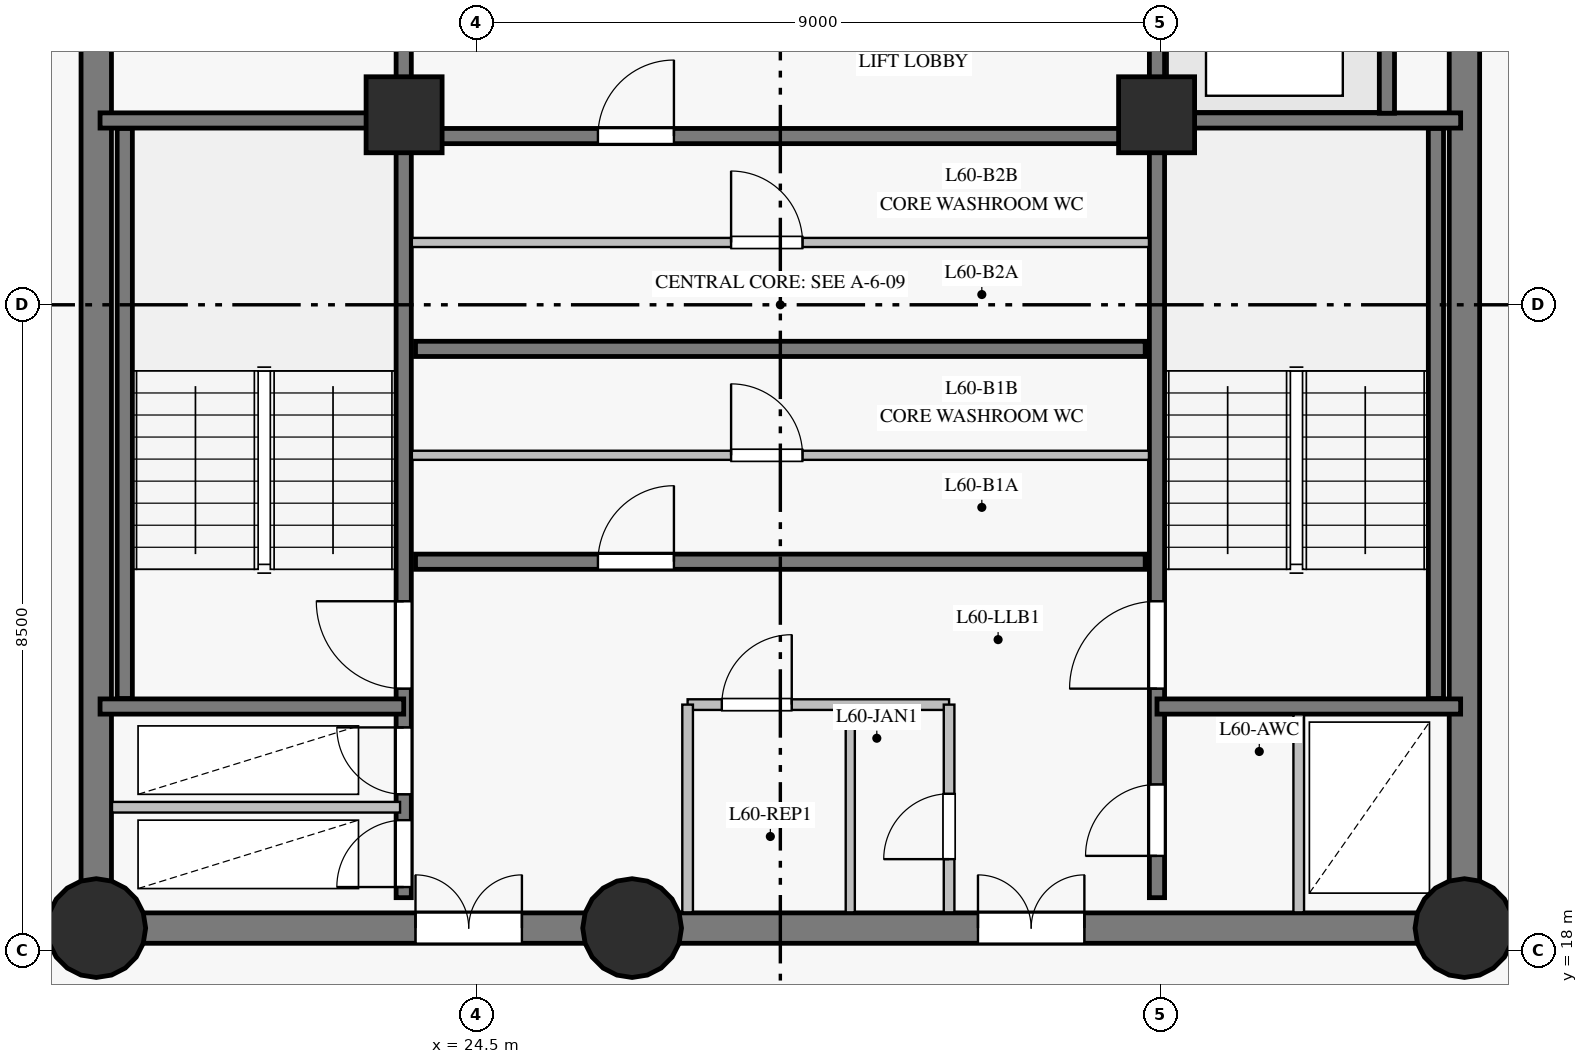
"""IFC4 building model, lengths in metres.
Left out: names, types, materials, properties, quantities, classifications, styles, units other than length and angle.
Written with IfcOpenShell. Run it as: python <this file> out.ifc"""

import sys

from ifc_helpers import new_model, si_unit, direction, frame, frame_2d, origin, origin_with_axes, origin_2d, place, context, subcontext, project, spatial, rectangle, circle, extrude, source, transform, mapped, element, fill, save


model = new_model("IFC4")
c1 = context("Model", 3, precision=1e-05, world=origin(), true_north=direction((0.0, 1.0)))
c2 = subcontext(c1, "Body", "Model", "MODEL_VIEW")
j1 = project(units=[si_unit("LENGTHUNIT", "METRE"), si_unit("PLANEANGLEUNIT", "RADIAN")], contexts=[c1])
p1 = place(None, origin())
s1 = spatial("IfcSite", under=j1, at=p1, CompositionType="ELEMENT")
p2 = place(p1, origin())
s2 = spatial("IfcBuilding", under=s1, at=p2, CompositionType="ELEMENT")
p3 = place(p2, frame((0.0, 0.0, 205.35)))
s3 = spatial("IfcBuildingStorey", under=s2, at=p3, CompositionType="ELEMENT", Elevation=205.35)
p4 = place(p3, frame((19.5, 18.3, 0.0), z_axis=(0.0, 0.0, 1.0), x_axis=(1.0, 0.0, 0.0)))
e1 = element("IfcWall", 1, at=p4, inside=s3, PredefinedType="SHEAR", context=c2, shape_type="SweptSolid", body=[
    extrude(rectangle(XDim=7.05, YDim=0.4, at=frame_2d((3.525, 0.0))), origin(), (0.0, 0.0, 1.0), 2.775),
])
p5 = place(p4, frame((4.2, 0.0, 0.0)))
e2 = element("IfcOpeningElement", 2, at=p5, cuts=e1, PredefinedType="OPENING", context=c2, shape_type="SweptSolid", body=[
    extrude(rectangle(XDim=1.4, YDim=2.2, at=frame_2d((0.7, 1.1))), frame((0.0, 0.21, 0.0), z_axis=(0.0, -1.0, 0.0), x_axis=(1.0, 0.0, 0.0)), (0.0, 0.0, 1.0), 0.42),
])
p6 = place(p3, frame((26.55, 18.3, 0.0), z_axis=(0.0, 0.0, 1.0), x_axis=(1.0, 0.0, 0.0)))
e3 = element("IfcWall", 3, at=p6, inside=s3, PredefinedType="SHEAR", context=c2, shape_type="SweptSolid", body=[
    extrude(rectangle(XDim=10.95, YDim=0.4, at=frame_2d((5.475, 0.0))), origin(), (0.0, 0.0, 1.0), 2.775),
])
p7 = place(p6, frame((4.55, 0.0, 0.0)))
e4 = element("IfcOpeningElement", 4, at=p7, cuts=e3, PredefinedType="OPENING", context=c2, shape_type="SweptSolid", body=[
    extrude(rectangle(XDim=1.4, YDim=2.2, at=frame_2d((0.7, 1.1))), frame((0.0, 0.21, 0.0), z_axis=(0.0, -1.0, 0.0), x_axis=(1.0, 0.0, 0.0)), (0.0, 0.0, 1.0), 0.42),
])
p8 = place(p3, frame((37.5, 18.3, 0.0), z_axis=(0.0, 0.0, 1.0), x_axis=(0.0, 1.0, 0.0)))
e5 = element("IfcWall", 5, at=p8, inside=s3, PredefinedType="SHEAR", context=c2, shape_type="SweptSolid", body=[
    extrude(rectangle(XDim=16.4, YDim=0.4, at=frame_2d((8.2, 0.0))), origin(), (0.0, 0.0, 1.0), 2.775),
])
p9 = place(p8, frame((13.85, 0.0, 0.0)))
e6 = element("IfcOpeningElement", 6, at=p9, cuts=e5, PredefinedType="OPENING", context=c2, shape_type="SweptSolid", body=[
    extrude(rectangle(XDim=1.2, YDim=2.15, at=frame_2d((0.6, 1.075))), frame((0.0, 0.21, 0.0), z_axis=(0.0, -1.0, 0.0), x_axis=(1.0, 0.0, 0.0)), (0.0, 0.0, 1.0), 0.42),
])
p10 = place(p3, frame((19.5, 34.7, 0.0), z_axis=(0.0, 0.0, 1.0), x_axis=(0.0, -1.0, 0.0)))
e7 = element("IfcWall", 7, at=p10, inside=s3, PredefinedType="SHEAR", context=c2, shape_type="SweptSolid", body=[
    extrude(rectangle(XDim=16.4, YDim=0.4, at=frame_2d((8.2, 0.0))), origin(), (0.0, 0.0, 1.0), 2.775),
])
p11 = place(p10, frame((3.1, 0.0, 0.0)))
e8 = element("IfcOpeningElement", 8, at=p11, cuts=e7, PredefinedType="OPENING", context=c2, shape_type="SweptSolid", body=[
    extrude(rectangle(XDim=1.1, YDim=2.15, at=frame_2d((0.55, 1.075))), frame((0.0, 0.21, 0.0), z_axis=(0.0, -1.0, 0.0), x_axis=(1.0, 0.0, 0.0)), (0.0, 0.0, 1.0), 0.42),
])
m1 = source(origin_with_axes(), c2, "Body", "SweptSolid", [
    extrude(circle(Radius=0.65, at=origin_2d()), origin(), (0.0, 0.0, 1.0), 3.05),
])
for number, where, z_axis, x_axis in (
    (9, (19.5, 18.3, 0.0), (0.0, 0.0, 1.0), (1.0, 0.0, 0.0)),
    (10, (26.55, 18.3, 0.0), (0.0, 0.0, 1.0), (1.0, 0.0, 0.0)),
    (11, (37.5, 18.3, 0.0), (0.0, 0.0, 1.0), (1.0, 0.0, 0.0)),
):
    element("IfcColumn", number, at=place(p3, frame(where, z_axis=z_axis, x_axis=x_axis)), inside=s3, PredefinedType="COLUMN", context=c2, shape_type="MappedRepresentation", body=[
        mapped(m1, transform((0.0, 0.0, 0.0), scale=1.0)),
    ])
m2 = source(origin_with_axes(), c2, "Body", "SweptSolid", [
    extrude(rectangle(XDim=1.0, YDim=1.0, at=origin_2d()), origin(), (0.0, 0.0, 1.0), 3.05),
])
for number, where, z_axis, x_axis in (
    (12, (23.55, 29.0, 0.0), (0.0, 0.0, 1.0), (1.0, 0.0, 0.0)),
    (13, (33.45, 29.0, 0.0), (0.0, 0.0, 1.0), (1.0, 0.0, 0.0)),
):
    element("IfcColumn", number, at=place(p3, frame(where, z_axis=z_axis, x_axis=x_axis)), inside=s3, PredefinedType="COLUMN", context=c2, shape_type="MappedRepresentation", body=[
        mapped(m2, transform((0.0, 0.0, 0.0), scale=1.0)),
    ])
p12 = place(p3, frame((23.545, 18.7, 0.0), z_axis=(0.0, 0.0, 1.0), x_axis=(0.0, 1.0, 0.0)))
e14 = element("IfcWall", 14, at=p12, inside=s3, PredefinedType="SHEAR", context=c2, shape_type="SweptSolid", body=[
    extrude(rectangle(XDim=15.6, YDim=0.2, at=frame_2d((7.8, 0.0))), origin(), (0.0, 0.0, 1.0), 2.775),
])
p13 = place(p12, frame((2.75, 0.0, 0.0)))
e15 = element("IfcOpeningElement", 15, at=p13, cuts=e14, PredefinedType="OPENING", context=c2, shape_type="SweptSolid", body=[
    extrude(rectangle(XDim=1.15, YDim=2.15, at=frame_2d((0.575, 1.075))), frame((0.0, 0.11, 0.0), z_axis=(0.0, -1.0, 0.0), x_axis=(1.0, 0.0, 0.0)), (0.0, 0.0, 1.0), 0.22),
])
p14 = place(p12, frame((0.14, 0.0, 0.0)))
e16 = element("IfcOpeningElement", 16, at=p14, cuts=e14, PredefinedType="OPENING", context=c2, shape_type="SweptSolid", body=[
    extrude(rectangle(XDim=0.88, YDim=2.1, at=frame_2d((0.44, 1.05))), frame((0.0, 0.11, 0.0), z_axis=(0.0, -1.0, 0.0), x_axis=(1.0, 0.0, 0.0)), (0.0, 0.0, 1.0), 0.22),
])
p15 = place(p12, frame((1.36, 0.0, 0.0)))
e17 = element("IfcOpeningElement", 17, at=p15, cuts=e14, PredefinedType="OPENING", context=c2, shape_type="SweptSolid", body=[
    extrude(rectangle(XDim=0.88, YDim=2.1, at=frame_2d((0.44, 1.05))), frame((0.0, 0.11, 0.0), z_axis=(0.0, -1.0, 0.0), x_axis=(1.0, 0.0, 0.0)), (0.0, 0.0, 1.0), 0.22),
])
p16 = place(p12, frame((12.1, 0.0, 0.0)))
e18 = element("IfcOpeningElement", 18, at=p16, cuts=e14, PredefinedType="OPENING", context=c2, shape_type="SweptSolid", body=[
    extrude(rectangle(XDim=1.12, YDim=2.15, at=frame_2d((0.56, 1.075))), frame((0.0, 0.11, 0.0), z_axis=(0.0, -1.0, 0.0), x_axis=(1.0, 0.0, 0.0)), (0.0, 0.0, 1.0), 0.22),
])
p17 = place(p12, frame((14.05, 0.0, 0.0)))
e19 = element("IfcOpeningElement", 19, at=p17, cuts=e14, PredefinedType="OPENING", context=c2, shape_type="SweptSolid", body=[
    extrude(rectangle(XDim=1.12, YDim=2.15, at=frame_2d((0.56, 1.075))), frame((0.0, 0.11, 0.0), z_axis=(0.0, -1.0, 0.0), x_axis=(1.0, 0.0, 0.0)), (0.0, 0.0, 1.0), 0.22),
])
p18 = place(p3, frame((33.455, 18.7, 0.0), z_axis=(0.0, 0.0, 1.0), x_axis=(0.0, 1.0, 0.0)))
e20 = element("IfcWall", 20, at=p18, inside=s3, PredefinedType="SHEAR", context=c2, shape_type="SweptSolid", body=[
    extrude(rectangle(XDim=15.6, YDim=0.2, at=frame_2d((7.8, 0.0))), origin(), (0.0, 0.0, 1.0), 2.775),
])
p19 = place(p18, frame((2.75, 0.0, 0.0)))
e21 = element("IfcOpeningElement", 21, at=p19, cuts=e20, PredefinedType="OPENING", context=c2, shape_type="SweptSolid", body=[
    extrude(rectangle(XDim=1.15, YDim=2.15, at=frame_2d((0.575, 1.075))), frame((0.0, 0.11, 0.0), z_axis=(0.0, -1.0, 0.0), x_axis=(1.0, 0.0, 0.0)), (0.0, 0.0, 1.0), 0.22),
])
p20 = place(p18, frame((0.55, 0.0, 0.0)))
e22 = element("IfcOpeningElement", 22, at=p20, cuts=e20, PredefinedType="OPENING", context=c2, shape_type="SweptSolid", body=[
    extrude(rectangle(XDim=0.94, YDim=2.1, at=frame_2d((0.47, 1.05))), frame((0.0, 0.11, 0.0), z_axis=(0.0, -1.0, 0.0), x_axis=(1.0, 0.0, 0.0)), (0.0, 0.0, 1.0), 0.22),
])
p21 = place(p3, frame((23.7, 23.12, 0.0), z_axis=(0.0, 0.0, 1.0), x_axis=(1.0, 0.0, 0.0)))
e23 = element("IfcWall", 23, at=p21, inside=s3, PredefinedType="SHEAR", context=c2, shape_type="SweptSolid", body=[
    extrude(rectangle(XDim=9.6, YDim=0.2, at=frame_2d((4.8, 0.0))), origin(), (0.0, 0.0, 1.0), 2.775),
])
p22 = place(p21, frame((2.4, 0.0, 0.0)))
e24 = element("IfcOpeningElement", 24, at=p22, cuts=e23, PredefinedType="OPENING", context=c2, shape_type="SweptSolid", body=[
    extrude(rectangle(XDim=1.0, YDim=2.15, at=frame_2d((0.5, 1.075))), frame((0.0, 0.11, 0.0), z_axis=(0.0, -1.0, 0.0), x_axis=(1.0, 0.0, 0.0)), (0.0, 0.0, 1.0), 0.22),
])
p23 = place(p3, frame((23.7, 25.92, 0.0), z_axis=(0.0, 0.0, 1.0), x_axis=(1.0, 0.0, 0.0)))
e25 = element("IfcWall", 25, at=p23, inside=s3, PredefinedType="SHEAR", context=c2, shape_type="SweptSolid", body=[
    extrude(rectangle(XDim=9.6, YDim=0.2, at=frame_2d((4.8, 0.0))), origin(), (0.0, 0.0, 1.0), 2.775),
])
p24 = place(p3, frame((23.7, 28.72, 0.0), z_axis=(0.0, 0.0, 1.0), x_axis=(1.0, 0.0, 0.0)))
e26 = element("IfcWall", 26, at=p24, inside=s3, PredefinedType="SHEAR", context=c2, shape_type="SweptSolid", body=[
    extrude(rectangle(XDim=9.6, YDim=0.2, at=frame_2d((4.8, 0.0))), origin(), (0.0, 0.0, 1.0), 2.775),
])
p25 = place(p24, frame((2.4, 0.0, 0.0)))
e27 = element("IfcOpeningElement", 27, at=p25, cuts=e26, PredefinedType="OPENING", context=c2, shape_type="SweptSolid", body=[
    extrude(rectangle(XDim=1.0, YDim=2.15, at=frame_2d((0.5, 1.075))), frame((0.0, 0.11, 0.0), z_axis=(0.0, -1.0, 0.0), x_axis=(1.0, 0.0, 0.0)), (0.0, 0.0, 1.0), 0.22),
])
for number, where, z_axis, x_axis in (
    (28, (19.875, 21.32, 0.0), (0.0, 0.0, 1.0), (0.0, 1.0, 0.0)),
    (29, (37.125, 21.32, 0.0), (0.0, 0.0, 1.0), (0.0, 1.0, 0.0)),
):
    element("IfcWall", number, at=place(p3, frame(where, z_axis=z_axis, x_axis=x_axis)), inside=s3, PredefinedType="SHEAR", context=c2, shape_type="SweptSolid", body=[
        extrude(rectangle(XDim=7.5, YDim=0.2, at=frame_2d((3.75, 0.0))), origin(), (0.0, 0.0, 1.0), 2.775),
    ])
for number, where, z_axis, x_axis in (
    (30, (33.455, 21.215, 0.0), (0.0, 0.0, 1.0), (1.0, 0.0, 0.0)),
    (31, (33.455, 28.925, 0.0), (0.0, 0.0, 1.0), (1.0, 0.0, 0.0)),
    (32, (19.55, 21.215, 0.0), (0.0, 0.0, 1.0), (1.0, 0.0, 0.0)),
    (33, (19.55, 28.925, 0.0), (0.0, 0.0, 1.0), (1.0, 0.0, 0.0)),
):
    element("IfcWall", number, at=place(p3, frame(where, z_axis=z_axis, x_axis=x_axis)), inside=s3, PredefinedType="SHEAR", context=c2, shape_type="SweptSolid", body=[
        extrude(rectangle(XDim=3.995, YDim=0.2, at=frame_2d((1.998, 0.0))), origin(), (0.0, 0.0, 1.0), 2.775),
    ])
p26 = place(p3, frame((36.48, 29.02, 0.0), z_axis=(0.0, 0.0, 1.0), x_axis=(0.0, 1.0, 0.0)))
e34 = element("IfcWall", 34, at=p26, inside=s3, PredefinedType="SHEAR", context=c2, shape_type="SweptSolid", body=[
    extrude(rectangle(XDim=2.86, YDim=0.2, at=frame_2d((1.43, 0.0))), origin(), (0.0, 0.0, 1.0), 2.775),
])
p27 = place(p3, frame((23.652, 24.52, 0.0), z_axis=(0.0, 0.0, 1.0), x_axis=(1.0, 0.0, 0.0)))
e35 = element("IfcWall", 35, at=p27, inside=s3, PredefinedType="PARTITIONING", context=c2, shape_type="SweptSolid", body=[
    extrude(rectangle(XDim=9.698, YDim=0.12, at=frame_2d((4.849, 0.0))), origin(), (0.0, 0.0, 1.0), 2.775),
])
p28 = place(p27, frame((4.2, 0.0, 0.0)))
e36 = element("IfcOpeningElement", 36, at=p28, cuts=e35, PredefinedType="OPENING", context=c2, shape_type="SweptSolid", body=[
    extrude(rectangle(XDim=0.94, YDim=2.1, at=frame_2d((0.47, 1.05))), frame((0.0, 0.07, 0.0), z_axis=(0.0, -1.0, 0.0), x_axis=(1.0, 0.0, 0.0)), (0.0, 0.0, 1.0), 0.14),
])
p29 = place(p3, frame((23.652, 27.32, 0.0), z_axis=(0.0, 0.0, 1.0), x_axis=(1.0, 0.0, 0.0)))
e37 = element("IfcWall", 37, at=p29, inside=s3, PredefinedType="PARTITIONING", context=c2, shape_type="SweptSolid", body=[
    extrude(rectangle(XDim=9.698, YDim=0.12, at=frame_2d((4.849, 0.0))), origin(), (0.0, 0.0, 1.0), 2.775),
])
p30 = place(p29, frame((4.2, 0.0, 0.0)))
e38 = element("IfcOpeningElement", 38, at=p30, cuts=e37, PredefinedType="OPENING", context=c2, shape_type="SweptSolid", body=[
    extrude(rectangle(XDim=0.94, YDim=2.1, at=frame_2d((0.47, 1.05))), frame((0.0, 0.07, 0.0), z_axis=(0.0, -1.0, 0.0), x_axis=(1.0, 0.0, 0.0)), (0.0, 0.0, 1.0), 0.14),
])
p31 = place(p3, frame((19.707, 19.89, 0.0), z_axis=(0.0, 0.0, 1.0), x_axis=(1.0, 0.0, 0.0)))
e39 = element("IfcWall", 39, at=p31, inside=s3, PredefinedType="PARTITIONING", context=c2, shape_type="SweptSolid", body=[
    extrude(rectangle(XDim=3.79, YDim=0.14, at=frame_2d((1.895, 0.0))), origin(), (0.0, 0.0, 1.0), 2.775),
])
p32 = place(p3, frame((27.28, 21.24, 0.0), z_axis=(0.0, 0.0, 1.0), x_axis=(1.0, 0.0, 0.0)))
e40 = element("IfcWall", 40, at=p32, inside=s3, PredefinedType="PARTITIONING", context=c2, shape_type="SweptSolid", body=[
    extrude(rectangle(XDim=3.44, YDim=0.14, at=frame_2d((1.72, 0.0))), origin(), (0.0, 0.0, 1.0), 2.775),
])
p33 = place(p32, frame((0.45, 0.0, 0.0)))
e41 = element("IfcOpeningElement", 41, at=p33, cuts=e40, PredefinedType="OPENING", context=c2, shape_type="SweptSolid", body=[
    extrude(rectangle(XDim=0.92, YDim=2.1, at=frame_2d((0.46, 1.05))), frame((0.0, 0.08, 0.0), z_axis=(0.0, -1.0, 0.0), x_axis=(1.0, 0.0, 0.0)), (0.0, 0.0, 1.0), 0.16),
])
p34 = place(p3, frame((27.28, 18.507, 0.0), z_axis=(0.0, 0.0, 1.0), x_axis=(0.0, 1.0, 0.0)))
e42 = element("IfcWall", 42, at=p34, inside=s3, PredefinedType="PARTITIONING", context=c2, shape_type="SweptSolid", body=[
    extrude(rectangle(XDim=2.733, YDim=0.14, at=frame_2d((1.366, 0.0))), origin(), (0.0, 0.0, 1.0), 2.775),
])
p35 = place(p3, frame((30.72, 18.507, 0.0), z_axis=(0.0, 0.0, 1.0), x_axis=(0.0, 1.0, 0.0)))
e43 = element("IfcWall", 43, at=p35, inside=s3, PredefinedType="PARTITIONING", context=c2, shape_type="SweptSolid", body=[
    extrude(rectangle(XDim=2.733, YDim=0.14, at=frame_2d((1.366, 0.0))), origin(), (0.0, 0.0, 1.0), 2.775),
])
p36 = place(p35, frame((0.7, 0.0, 0.0)))
e44 = element("IfcOpeningElement", 44, at=p36, cuts=e43, PredefinedType="OPENING", context=c2, shape_type="SweptSolid", body=[
    extrude(rectangle(XDim=0.86, YDim=2.1, at=frame_2d((0.43, 1.05))), frame((0.0, 0.08, 0.0), z_axis=(0.0, -1.0, 0.0), x_axis=(1.0, 0.0, 0.0)), (0.0, 0.0, 1.0), 0.16),
])
p37 = place(p3, frame((29.42, 18.507, 0.0), z_axis=(0.0, 0.0, 1.0), x_axis=(0.0, 1.0, 0.0)))
e45 = element("IfcWall", 45, at=p37, inside=s3, PredefinedType="PARTITIONING", context=c2, shape_type="SweptSolid", body=[
    extrude(rectangle(XDim=2.662, YDim=0.12, at=frame_2d((1.331, 0.0))), origin(), (0.0, 0.0, 1.0), 2.775),
])
p38 = place(p3, frame((35.32, 18.507, 0.0), z_axis=(0.0, 0.0, 1.0), x_axis=(0.0, 1.0, 0.0)))
e46 = element("IfcWall", 46, at=p38, inside=s3, PredefinedType="PARTITIONING", context=c2, shape_type="SweptSolid", body=[
    extrude(rectangle(XDim=2.604, YDim=0.14, at=frame_2d((1.302, 0.0))), origin(), (0.0, 0.0, 1.0), 2.775),
])
m3 = source(origin_with_axes(), c2, "Body", "SweptSolid", [
    extrude(rectangle(XDim=1.15, YDim=2.15, at=frame_2d((0.575, 1.075))), frame((0.0, 0.025, 0.0), z_axis=(0.0, -1.0, 0.0), x_axis=(1.0, 0.0, 0.0)), (0.0, 0.0, 1.0), 0.05),
])
p39 = place(p13, origin())
e47 = element("IfcDoor", 47, at=p39, inside=s3, OperationType="SINGLE_SWING_RIGHT", PredefinedType="DOOR", context=c2, shape_type="MappedRepresentation", body=[
    mapped(m3, transform((0.0, 0.0, 0.0), scale=1.0)),
])
fill(e15, e47)
p40 = place(p19, origin())
e48 = element("IfcDoor", 48, at=p40, inside=s3, OperationType="SINGLE_SWING_LEFT", PredefinedType="DOOR", context=c2, shape_type="MappedRepresentation", body=[
    mapped(m3, transform((0.0, 0.0, 0.0), scale=1.0)),
])
fill(e21, e48)
m4 = source(origin_with_axes(), c2, "Body", "SweptSolid", [
    extrude(rectangle(XDim=0.88, YDim=2.1, at=frame_2d((0.44, 1.05))), frame((0.0, 0.025, 0.0), z_axis=(0.0, -1.0, 0.0), x_axis=(1.0, 0.0, 0.0)), (0.0, 0.0, 1.0), 0.05),
])
p41 = place(p14, origin())
e49 = element("IfcDoor", 49, at=p41, inside=s3, OperationType="SINGLE_SWING_LEFT", PredefinedType="DOOR", context=c2, shape_type="MappedRepresentation", body=[
    mapped(m4, transform((0.0, 0.0, 0.0), scale=1.0)),
])
fill(e16, e49)
p42 = place(p15, origin())
e50 = element("IfcDoor", 50, at=p42, inside=s3, OperationType="SINGLE_SWING_RIGHT", PredefinedType="DOOR", context=c2, shape_type="MappedRepresentation", body=[
    mapped(m4, transform((0.0, 0.0, 0.0), scale=1.0)),
])
fill(e17, e50)
m5 = source(origin_with_axes(), c2, "Body", "SweptSolid", [
    extrude(rectangle(XDim=1.4, YDim=2.2, at=frame_2d((0.7, 1.1))), frame((0.0, 0.025, 0.0), z_axis=(0.0, -1.0, 0.0), x_axis=(1.0, 0.0, 0.0)), (0.0, 0.0, 1.0), 0.05),
])
p43 = place(p5, origin())
e51 = element("IfcDoor", 51, at=p43, inside=s3, OperationType="DOUBLE_DOOR_SINGLE_SWING", PredefinedType="DOOR", context=c2, shape_type="MappedRepresentation", body=[
    mapped(m5, transform((0.0, 0.0, 0.0), scale=1.0)),
])
fill(e2, e51)
p44 = place(p7, origin())
e52 = element("IfcDoor", 52, at=p44, inside=s3, OperationType="DOUBLE_DOOR_SINGLE_SWING", PredefinedType="DOOR", context=c2, shape_type="MappedRepresentation", body=[
    mapped(m5, transform((0.0, 0.0, 0.0), scale=1.0)),
])
fill(e4, e52)
m6 = source(origin_with_axes(), c2, "Body", "SweptSolid", [
    extrude(rectangle(XDim=0.94, YDim=2.1, at=frame_2d((0.47, 1.05))), frame((0.0, 0.025, 0.0), z_axis=(0.0, -1.0, 0.0), x_axis=(1.0, 0.0, 0.0)), (0.0, 0.0, 1.0), 0.05),
])
p45 = place(p20, origin())
e53 = element("IfcDoor", 53, at=p45, inside=s3, OperationType="SINGLE_SWING_LEFT", PredefinedType="DOOR", context=c2, shape_type="MappedRepresentation", body=[
    mapped(m6, transform((0.0, 0.0, 0.0), scale=1.0)),
])
fill(e22, e53)
m7 = source(origin_with_axes(), c2, "Body", "SweptSolid", [
    extrude(rectangle(XDim=0.92, YDim=2.1, at=frame_2d((0.46, 1.05))), frame((0.0, 0.025, 0.0), z_axis=(0.0, -1.0, 0.0), x_axis=(1.0, 0.0, 0.0)), (0.0, 0.0, 1.0), 0.05),
])
p46 = place(p33, origin())
e54 = element("IfcDoor", 54, at=p46, inside=s3, OperationType="SINGLE_SWING_RIGHT", PredefinedType="DOOR", context=c2, shape_type="MappedRepresentation", body=[
    mapped(m7, transform((0.0, 0.0, 0.0), scale=1.0)),
])
fill(e41, e54)
m8 = source(origin_with_axes(), c2, "Body", "SweptSolid", [
    extrude(rectangle(XDim=0.86, YDim=2.1, at=frame_2d((0.43, 1.05))), frame((0.0, 0.025, 0.0), z_axis=(0.0, -1.0, 0.0), x_axis=(1.0, 0.0, 0.0)), (0.0, 0.0, 1.0), 0.05),
])
p47 = place(p36, origin())
e55 = element("IfcDoor", 55, at=p47, inside=s3, OperationType="SINGLE_SWING_LEFT", PredefinedType="DOOR", context=c2, shape_type="MappedRepresentation", body=[
    mapped(m8, transform((0.0, 0.0, 0.0), scale=1.0)),
])
fill(e44, e55)
m9 = source(origin_with_axes(), c2, "Body", "SweptSolid", [
    extrude(rectangle(XDim=1.0, YDim=2.15, at=frame_2d((0.5, 1.075))), frame((0.0, 0.025, 0.0), z_axis=(0.0, -1.0, 0.0), x_axis=(1.0, 0.0, 0.0)), (0.0, 0.0, 1.0), 0.05),
])
p48 = place(p22, origin())
e56 = element("IfcDoor", 56, at=p48, inside=s3, OperationType="SINGLE_SWING_RIGHT", PredefinedType="DOOR", context=c2, shape_type="MappedRepresentation", body=[
    mapped(m9, transform((0.0, 0.0, 0.0), scale=1.0)),
])
fill(e24, e56)
p49 = place(p28, origin())
e57 = element("IfcDoor", 57, at=p49, inside=s3, OperationType="SINGLE_SWING_LEFT", PredefinedType="DOOR", context=c2, shape_type="MappedRepresentation", body=[
    mapped(m6, transform((0.0, 0.0, 0.0), scale=1.0)),
])
fill(e36, e57)
p50 = place(p25, origin())
e58 = element("IfcDoor", 58, at=p50, inside=s3, OperationType="SINGLE_SWING_RIGHT", PredefinedType="DOOR", context=c2, shape_type="MappedRepresentation", body=[
    mapped(m9, transform((0.0, 0.0, 0.0), scale=1.0)),
])
fill(e27, e58)
p51 = place(p30, origin())
e59 = element("IfcDoor", 59, at=p51, inside=s3, OperationType="SINGLE_SWING_LEFT", PredefinedType="DOOR", context=c2, shape_type="MappedRepresentation", body=[
    mapped(m6, transform((0.0, 0.0, 0.0), scale=1.0)),
])
fill(e38, e59)
save(model, sys.argv[1])
